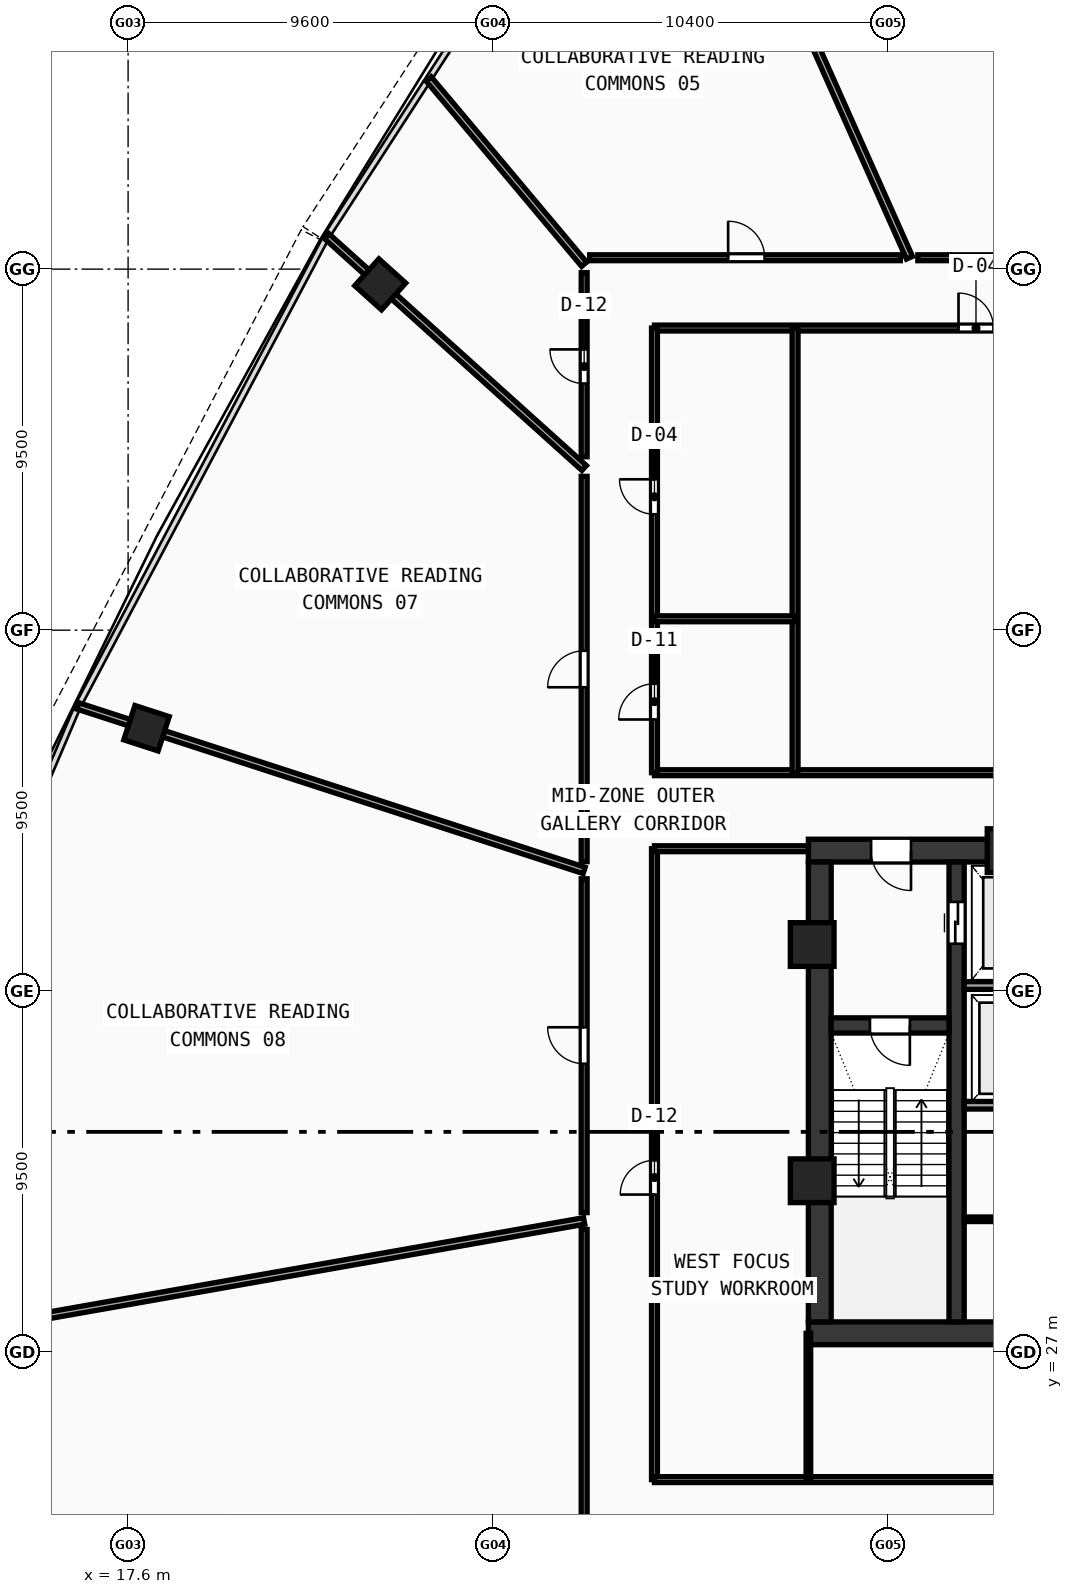
"""IFC4 building model, lengths in metres.
Left out: names, types, materials, properties, quantities, classifications, styles, units other than length and angle.
Written with IfcOpenShell. Run it as: python <this file> out.ifc"""

import sys

from ifc_helpers import new_model, si_unit, direction, frame, frame_2d, origin, origin_with_axes, origin_2d, place, context, subcontext, project, spatial, rectangle, hollow_rectangle, extrude, source, transform, mapped, element, fill, save


model = new_model("IFC4")
c1 = context("Model", 3, precision=1e-05, world=origin(), true_north=direction((0.0, 1.0)))
c2 = subcontext(c1, "Body", "Model", "MODEL_VIEW")
j1 = project(units=[si_unit("LENGTHUNIT", "METRE"), si_unit("PLANEANGLEUNIT", "RADIAN")], contexts=[c1])
p1 = place(None, origin())
s1 = spatial("IfcSite", under=j1, at=p1, CompositionType="ELEMENT")
p2 = place(p1, origin())
s2 = spatial("IfcBuilding", under=s1, at=p2, CompositionType="ELEMENT")
p3 = place(p2, frame((0.0, 0.0, 129.83)))
s3 = spatial("IfcBuildingStorey", under=s2, at=p3, CompositionType="ELEMENT", Elevation=129.83)
p4 = place(p3, frame((35.5, 27.5, 0.0), z_axis=(0.0, 0.0, 1.0), x_axis=(1.0, 0.0, 0.0)))
e1 = element("IfcWall", 1, at=p4, inside=s3, PredefinedType="SHEAR", context=c2, shape_type="SweptSolid", body=[
    extrude(rectangle(XDim=25.0, YDim=0.6, at=frame_2d((12.5, 0.0))), origin(), (0.0, 0.0, 1.0), 3.42),
])
p5 = place(p3, frame((35.5, 40.2, 0.0), z_axis=(0.0, 0.0, 1.0), x_axis=(1.0, 0.0, 0.0)))
e2 = element("IfcWall", 2, at=p5, inside=s3, PredefinedType="SHEAR", context=c2, shape_type="SweptSolid", body=[
    extrude(rectangle(XDim=11.3, YDim=0.6, at=frame_2d((5.65, 0.0))), origin(), (0.0, 0.0, 1.0), 3.42),
])
p6 = place(p5, frame((1.65, 0.0, 0.0)))
e3 = element("IfcOpeningElement", 3, at=p6, cuts=e2, PredefinedType="OPENING", context=c2, shape_type="SweptSolid", body=[
    extrude(rectangle(XDim=1.05, YDim=2.1, at=frame_2d((0.525, 1.05))), frame((0.0, 0.31, 0.0), z_axis=(0.0, -1.0, 0.0), x_axis=(1.0, 0.0, 0.0)), (0.0, 0.0, 1.0), 0.62),
])
p7 = place(p3, frame((35.8, 27.8, 0.0), z_axis=(0.0, 0.0, 1.0), x_axis=(0.0, 1.0, 0.0)))
e4 = element("IfcWall", 4, at=p7, inside=s3, PredefinedType="SHEAR", context=c2, shape_type="SweptSolid", body=[
    extrude(rectangle(XDim=12.1, YDim=0.6, at=frame_2d((6.05, 0.0))), origin(), (0.0, 0.0, 1.0), 3.42),
])
p8 = place(p3, frame((39.4, 27.8, 0.0), z_axis=(0.0, 0.0, 1.0), x_axis=(0.0, 1.0, 0.0)))
e5 = element("IfcWall", 5, at=p8, inside=s3, PredefinedType="SHEAR", context=c2, shape_type="SweptSolid", body=[
    extrude(rectangle(XDim=12.1, YDim=0.4, at=frame_2d((6.05, 0.0))), origin(), (0.0, 0.0, 1.0), 3.42),
])
p9 = place(p8, frame((9.95, 0.0, 0.0)))
e6 = element("IfcOpeningElement", 6, at=p9, cuts=e5, PredefinedType="OPENING", context=c2, shape_type="SweptSolid", body=[
    extrude(rectangle(XDim=1.1, YDim=2.1, at=frame_2d((0.55, 1.05))), frame((0.0, 0.21, 0.0), z_axis=(0.0, -1.0, 0.0), x_axis=(1.0, 0.0, 0.0)), (0.0, 0.0, 1.0), 0.42),
])
p10 = place(p3, frame((36.1, 35.6, 0.0), z_axis=(0.0, 0.0, 1.0), x_axis=(1.0, 0.0, 0.0)))
e7 = element("IfcWall", 7, at=p10, inside=s3, PredefinedType="SHEAR", context=c2, shape_type="SweptSolid", body=[
    extrude(rectangle(XDim=3.1, YDim=0.4, at=frame_2d((1.55, 0.0))), origin(), (0.0, 0.0, 1.0), 3.42),
])
p11 = place(p10, frame((1.02, 0.0, 0.0)))
e8 = element("IfcOpeningElement", 8, at=p11, cuts=e7, PredefinedType="OPENING", context=c2, shape_type="SweptSolid", body=[
    extrude(rectangle(XDim=1.05, YDim=2.1, at=frame_2d((0.525, 1.05))), frame((0.0, 0.21, 0.0), z_axis=(0.0, -1.0, 0.0), x_axis=(1.0, 0.0, 0.0)), (0.0, 0.0, 1.0), 0.42),
])
m1 = source(origin(), c2, "Body", "SweptSolid", [
    extrude(hollow_rectangle(XDim=1.15, YDim=1.15, WallThickness=0.048, at=origin_2d()), origin(), (0.0, 0.0, 1.0), 3.68),
])
for number, where, z_axis, x_axis in (
    (9, (40.781, 40.2, -0.26), (0.0, 0.0, 1.0), (1.0, 0.0, 0.0)),
    (10, (35.6, 37.729, -0.26), (0.0, 0.0, 1.0), (1.0, 0.0, 0.0)),
    (11, (35.6, 31.513, -0.26), (0.0, 0.0, 1.0), (1.0, 0.0, 0.0)),
):
    element("IfcColumn", number, at=place(p3, frame(where, z_axis=z_axis, x_axis=x_axis)), inside=s3, PredefinedType="COLUMN", context=c2, shape_type="MappedRepresentation", body=[
        mapped(m1, transform((0.0, 0.0, 0.0), scale=1.0)),
    ])
m2 = source(origin(), c2, "Body", "SweptSolid", [
    extrude(hollow_rectangle(XDim=0.95, YDim=0.95, WallThickness=0.04, at=origin_2d()), origin(), (0.0, 0.0, 1.0), 3.68),
])
for number, where, z_axis, x_axis in (
    (12, (24.234, 55.099, -0.26), (0.0, 0.0, 1.0), (-0.669, -0.743, 0.0)),
    (13, (18.085, 43.42, -0.26), (0.0, 0.0, 1.0), (-0.309, -0.951, 0.0)),
):
    element("IfcColumn", number, at=place(p3, frame(where, z_axis=z_axis, x_axis=x_axis)), inside=s3, PredefinedType="COLUMN", context=c2, shape_type="MappedRepresentation", body=[
        mapped(m2, transform((0.0, 0.0, 0.0), scale=1.0)),
    ])
for number, where, z_axis, x_axis in (
    (14, (39.6, 36.65, 0.0), (0.0, 0.0, 1.0), (1.0, 0.0, 0.0)),
    (15, (39.6, 33.5, 0.0), (0.0, 0.0, 1.0), (1.0, 0.0, 0.0)),
):
    element("IfcWall", number, at=place(p3, frame(where, z_axis=z_axis, x_axis=x_axis)), inside=s3, PredefinedType="SOLIDWALL", context=c2, shape_type="SweptSolid", body=[
        extrude(rectangle(XDim=2.72, YDim=0.2, at=frame_2d((1.36, 0.0))), origin(), (0.0, 0.0, 1.0), 3.42),
    ])
p12 = place(p3, frame((39.6, 30.5, 0.0), z_axis=(0.0, 0.0, 1.0), x_axis=(1.0, 0.0, 0.0)))
e16 = element("IfcWall", 16, at=p12, inside=s3, PredefinedType="PARTITIONING", context=c2, shape_type="SweptSolid", body=[
    extrude(rectangle(XDim=2.72, YDim=0.12, at=frame_2d((1.36, 0.0))), origin(), (0.0, 0.0, 1.0), 3.42),
])
p13 = place(p3, frame((31.45, 42.25, 0.0), z_axis=(0.0, 0.0, 1.0), x_axis=(1.0, 0.0, 0.0)))
e17 = element("IfcWall", 17, at=p13, inside=s3, PredefinedType="PARTITIONING", context=c2, shape_type="SweptSolid", body=[
    extrude(rectangle(XDim=33.1, YDim=0.155, at=frame_2d((16.55, 0.0))), origin(), (0.0, 0.0, 1.0), 2.77),
])
p14 = place(p3, frame((31.45, 53.95, 0.0), z_axis=(0.0, 0.0, 1.0), x_axis=(1.0, 0.0, 0.0)))
e18 = element("IfcWall", 18, at=p14, inside=s3, PredefinedType="PARTITIONING", context=c2, shape_type="SweptSolid", body=[
    extrude(rectangle(XDim=33.1, YDim=0.155, at=frame_2d((16.55, 0.0))), origin(), (0.0, 0.0, 1.0), 2.77),
])
p15 = place(p14, frame((8.0, 0.0, 0.0)))
e19 = element("IfcOpeningElement", 19, at=p15, cuts=e18, PredefinedType="OPENING", context=c2, shape_type="SweptSolid", body=[
    extrude(rectangle(XDim=0.92, YDim=2.1, at=frame_2d((0.46, 1.05))), frame((0.0, 0.087, 0.0), z_axis=(0.0, -1.0, 0.0), x_axis=(1.0, 0.0, 0.0)), (0.0, 0.0, 1.0), 0.175),
])
p16 = place(p14, frame((22.55, 0.0, 0.0)))
e20 = element("IfcOpeningElement", 20, at=p16, cuts=e18, PredefinedType="OPENING", context=c2, shape_type="SweptSolid", body=[
    extrude(rectangle(XDim=0.92, YDim=2.1, at=frame_2d((0.46, 1.05))), frame((0.0, 0.087, 0.0), z_axis=(0.0, -1.0, 0.0), x_axis=(1.0, 0.0, 0.0)), (0.0, 0.0, 1.0), 0.175),
])
p17 = place(p3, frame((31.45, 42.25, 0.0), z_axis=(0.0, 0.0, 1.0), x_axis=(0.0, 1.0, 0.0)))
e21 = element("IfcWall", 21, at=p17, inside=s3, PredefinedType="PARTITIONING", context=c2, shape_type="SweptSolid", body=[
    extrude(rectangle(XDim=11.7, YDim=0.155, at=frame_2d((5.85, 0.0))), origin(), (0.0, 0.0, 1.0), 2.77),
])
p18 = place(p17, frame((1.4, 0.0, 0.0)))
e22 = element("IfcOpeningElement", 22, at=p18, cuts=e21, PredefinedType="OPENING", context=c2, shape_type="SweptSolid", body=[
    extrude(rectangle(XDim=0.94, YDim=2.1, at=frame_2d((0.47, 1.05))), frame((0.0, 0.087, 0.0), z_axis=(0.0, -1.0, 0.0), x_axis=(1.0, 0.0, 0.0)), (0.0, 0.0, 1.0), 0.175),
])
p19 = place(p17, frame((6.8, 0.0, 0.0)))
e23 = element("IfcOpeningElement", 23, at=p19, cuts=e21, PredefinedType="OPENING", context=c2, shape_type="SweptSolid", body=[
    extrude(rectangle(XDim=0.92, YDim=2.1, at=frame_2d((0.46, 1.05))), frame((0.0, 0.087, 0.0), z_axis=(0.0, -1.0, 0.0), x_axis=(1.0, 0.0, 0.0)), (0.0, 0.0, 1.0), 0.175),
])
p20 = place(p3, frame((35.15, 42.25, 0.0), z_axis=(0.0, 0.0, 1.0), x_axis=(0.0, 1.0, 0.0)))
e24 = element("IfcWall", 24, at=p20, inside=s3, PredefinedType="PARTITIONING", context=c2, shape_type="SweptSolid", body=[
    extrude(rectangle(XDim=11.7, YDim=0.155, at=frame_2d((5.85, 0.0))), origin(), (0.0, 0.0, 1.0), 2.77),
])
p21 = place(p3, frame((31.45, 46.3, 0.0), z_axis=(0.0, 0.0, 1.0), x_axis=(1.0, 0.0, 0.0)))
e25 = element("IfcWall", 25, at=p21, inside=s3, PredefinedType="PARTITIONING", context=c2, shape_type="SweptSolid", body=[
    extrude(rectangle(XDim=3.7, YDim=0.155, at=frame_2d((1.85, 0.0))), origin(), (0.0, 0.0, 1.0), 2.77),
])
p22 = place(p3, frame((31.45, 23.65, 0.0), z_axis=(0.0, 0.0, 1.0), x_axis=(0.0, 1.0, 0.0)))
e26 = element("IfcWall", 26, at=p22, inside=s3, PredefinedType="PARTITIONING", context=c2, shape_type="SweptSolid", body=[
    extrude(rectangle(XDim=16.6, YDim=0.155, at=frame_2d((8.3, 0.0))), origin(), (0.0, 0.0, 1.0), 2.77),
])
p23 = place(p22, frame((7.5, 0.0, 0.0)))
e27 = element("IfcOpeningElement", 27, at=p23, cuts=e26, PredefinedType="OPENING", context=c2, shape_type="SweptSolid", body=[
    extrude(rectangle(XDim=0.9, YDim=2.08, at=frame_2d((0.45, 1.04))), frame((0.0, 0.087, 0.0), z_axis=(0.0, -1.0, 0.0), x_axis=(1.0, 0.0, 0.0)), (0.0, 0.0, 1.0), 0.175),
])
p24 = place(p3, frame((31.45, 23.65, 0.0), z_axis=(0.0, 0.0, 1.0), x_axis=(1.0, 0.0, 0.0)))
e28 = element("IfcWall", 28, at=p24, inside=s3, PredefinedType="PARTITIONING", context=c2, shape_type="SweptSolid", body=[
    extrude(rectangle(XDim=33.1, YDim=0.155, at=frame_2d((16.55, 0.0))), origin(), (0.0, 0.0, 1.0), 2.77),
])
p25 = place(p24, frame((16.0, 0.0, 0.0)))
e29 = element("IfcOpeningElement", 29, at=p25, cuts=e28, PredefinedType="OPENING", context=c2, shape_type="SweptSolid", body=[
    extrude(rectangle(XDim=0.92, YDim=2.1, at=frame_2d((0.46, 1.05))), frame((0.0, 0.087, 0.0), z_axis=(0.0, -1.0, 0.0), x_axis=(1.0, 0.0, 0.0)), (0.0, 0.0, 1.0), 0.175),
])
p26 = place(p3, frame((31.45, 40.25, 0.0), z_axis=(0.0, 0.0, 1.0), x_axis=(1.0, 0.0, 0.0)))
e30 = element("IfcWall", 30, at=p26, inside=s3, PredefinedType="PARTITIONING", context=c2, shape_type="SweptSolid", body=[
    extrude(rectangle(XDim=4.05, YDim=0.155, at=frame_2d((2.025, 0.0))), origin(), (0.0, 0.0, 1.0), 3.42),
])
p27 = place(p3, frame((35.5, 23.65, 0.0), z_axis=(0.0, 0.0, 1.0), x_axis=(0.0, 1.0, 0.0)))
e31 = element("IfcWall", 31, at=p27, inside=s3, PredefinedType="PARTITIONING", context=c2, shape_type="SweptSolid", body=[
    extrude(rectangle(XDim=3.85, YDim=0.12, at=frame_2d((1.925, 0.0))), origin(), (0.0, 0.0, 1.0), 3.02),
])
p28 = place(p3, frame((38.16, 55.8, 0.0), z_axis=(0.0, 0.0, 1.0), x_axis=(-0.406729069032, 0.913548829787, 0.0)))
e32 = element("IfcWall", 32, at=p28, inside=s3, PredefinedType="PARTITIONING", context=c2, shape_type="SweptSolid", body=[
    extrude(rectangle(XDim=15.723, YDim=0.175, at=frame_2d((7.862, 0.0))), origin(), (0.0, 0.0, 1.0), 2.77),
])
p29 = place(p3, frame((29.6, 55.628, 0.0), z_axis=(0.0, 0.0, 1.0), x_axis=(-0.642790889975, 0.766041690618, 0.0)))
e33 = element("IfcWall", 33, at=p29, inside=s3, PredefinedType="PARTITIONING", context=c2, shape_type="SweptSolid", body=[
    extrude(rectangle(XDim=6.366, YDim=0.175, at=frame_2d((3.183, 0.0))), origin(), (0.0, 0.0, 1.0), 2.77),
])
p30 = place(p3, frame((29.6, 50.267, 0.0), z_axis=(0.0, 0.0, 1.0), x_axis=(-0.743139639416, 0.669136366018, 0.0)))
e34 = element("IfcWall", 34, at=p30, inside=s3, PredefinedType="PARTITIONING", context=c2, shape_type="SweptSolid", body=[
    extrude(rectangle(XDim=9.115, YDim=0.175, at=frame_2d((4.558, 0.0))), origin(), (0.0, 0.0, 1.0), 2.77),
])
p31 = place(p3, frame((29.6, 39.678, 0.0), z_axis=(0.0, 0.0, 1.0), x_axis=(-0.95105622709, 0.309017884457, 0.0)))
e35 = element("IfcWall", 35, at=p31, inside=s3, PredefinedType="PARTITIONING", context=c2, shape_type="SweptSolid", body=[
    extrude(rectangle(XDim=14.006, YDim=0.175, at=frame_2d((7.003, 0.0))), origin(), (0.0, 0.0, 1.0), 2.77),
])
p32 = place(p3, frame((29.6, 30.456, 0.0), z_axis=(0.0, 0.0, 1.0), x_axis=(-0.98480711194, -0.173651813328, 0.0)))
e36 = element("IfcWall", 36, at=p32, inside=s3, PredefinedType="PARTITIONING", context=c2, shape_type="SweptSolid", body=[
    extrude(rectangle(XDim=20.967, YDim=0.175, at=frame_2d((10.483, 0.0))), origin(), (0.0, 0.0, 1.0), 2.77),
])
p33 = place(p3, frame((29.6, 21.8, 0.0), z_axis=(0.0, 0.0, 1.0), x_axis=(0.0, 1.0, 0.0)))
e37 = element("IfcWall", 37, at=p33, inside=s3, PredefinedType="PARTITIONING", context=c2, shape_type="SweptSolid", body=[
    extrude(rectangle(XDim=8.432, YDim=0.155, at=frame_2d((4.216, 0.0))), origin(), (0.0, 0.0, 1.0), 3.02),
])
p34 = place(p3, frame((29.6, 30.675, 0.0), z_axis=(0.0, 0.0, 1.0), x_axis=(0.0, 1.0, 0.0)))
e38 = element("IfcWall", 38, at=p34, inside=s3, PredefinedType="PARTITIONING", context=c2, shape_type="SweptSolid", body=[
    extrude(rectangle(XDim=8.783, YDim=0.155, at=frame_2d((4.392, 0.0))), origin(), (0.0, 0.0, 1.0), 3.42),
])
p35 = place(p34, frame((3.917, 0.0, 0.0)))
e39 = element("IfcOpeningElement", 39, at=p35, cuts=e38, PredefinedType="OPENING", context=c2, shape_type="SweptSolid", body=[
    extrude(rectangle(XDim=0.96, YDim=2.12, at=frame_2d((0.48, 1.06))), frame((0.0, 0.087, 0.0), z_axis=(0.0, -1.0, 0.0), x_axis=(1.0, 0.0, 0.0)), (0.0, 0.0, 1.0), 0.175),
])
p36 = place(p3, frame((29.6, 39.91, 0.0), z_axis=(0.0, 0.0, 1.0), x_axis=(0.0, 1.0, 0.0)))
e40 = element("IfcWall", 40, at=p36, inside=s3, PredefinedType="PARTITIONING", context=c2, shape_type="SweptSolid", body=[
    extrude(rectangle(XDim=10.138, YDim=0.155, at=frame_2d((5.069, 0.0))), origin(), (0.0, 0.0, 1.0), 2.77),
])
p37 = place(p36, frame((4.588, 0.0, 0.0)))
e41 = element("IfcOpeningElement", 41, at=p37, cuts=e40, PredefinedType="OPENING", context=c2, shape_type="SweptSolid", body=[
    extrude(rectangle(XDim=0.96, YDim=2.12, at=frame_2d((0.48, 1.06))), frame((0.0, 0.087, 0.0), z_axis=(0.0, -1.0, 0.0), x_axis=(1.0, 0.0, 0.0)), (0.0, 0.0, 1.0), 0.175),
])
p38 = place(p3, frame((29.6, 50.563, 0.0), z_axis=(0.0, 0.0, 1.0), x_axis=(0.0, 1.0, 0.0)))
e42 = element("IfcWall", 42, at=p38, inside=s3, PredefinedType="PARTITIONING", context=c2, shape_type="SweptSolid", body=[
    extrude(rectangle(XDim=4.845, YDim=0.155, at=frame_2d((2.422, 0.0))), origin(), (0.0, 0.0, 1.0), 3.02),
])
p39 = place(p38, frame((1.925, 0.0, 0.0)))
e43 = element("IfcOpeningElement", 43, at=p39, cuts=e42, PredefinedType="OPENING", context=c2, shape_type="SweptSolid", body=[
    extrude(rectangle(XDim=0.9, YDim=2.08, at=frame_2d((0.45, 1.04))), frame((0.0, 0.087, 0.0), z_axis=(0.0, -1.0, 0.0), x_axis=(1.0, 0.0, 0.0)), (0.0, 0.0, 1.0), 0.175),
])
p40 = place(p3, frame((29.743, 55.8, 0.0), z_axis=(0.0, 0.0, 1.0), x_axis=(1.0, 0.0, 0.0)))
e44 = element("IfcWall", 44, at=p40, inside=s3, PredefinedType="PARTITIONING", context=c2, shape_type="SweptSolid", body=[
    extrude(rectangle(XDim=8.177, YDim=0.155, at=frame_2d((4.088, 0.0))), origin(), (0.0, 0.0, 1.0), 3.02),
])
p41 = place(p40, frame((3.646, 0.0, 0.0)))
e45 = element("IfcOpeningElement", 45, at=p41, cuts=e44, PredefinedType="OPENING", context=c2, shape_type="SweptSolid", body=[
    extrude(rectangle(XDim=0.96, YDim=2.12, at=frame_2d((0.48, 1.06))), frame((0.0, 0.087, 0.0), z_axis=(0.0, -1.0, 0.0), x_axis=(1.0, 0.0, 0.0)), (0.0, 0.0, 1.0), 0.175),
])
p42 = place(p3, frame((38.38, 55.8, 0.0), z_axis=(0.0, 0.0, 1.0), x_axis=(1.0, 0.0, 0.0)))
e46 = element("IfcWall", 46, at=p42, inside=s3, PredefinedType="PARTITIONING", context=c2, shape_type="SweptSolid", body=[
    extrude(rectangle(XDim=5.329, YDim=0.155, at=frame_2d((2.665, 0.0))), origin(), (0.0, 0.0, 1.0), 2.77),
])
p43 = place(p42, frame((2.115, 0.0, 0.0)))
e47 = element("IfcOpeningElement", 47, at=p43, cuts=e46, PredefinedType="OPENING", context=c2, shape_type="SweptSolid", body=[
    extrude(rectangle(XDim=0.96, YDim=2.12, at=frame_2d((0.48, 1.06))), frame((0.0, 0.087, 0.0), z_axis=(0.0, -1.0, 0.0), x_axis=(1.0, 0.0, 0.0)), (0.0, 0.0, 1.0), 0.175),
])
m3 = source(origin(), c2, "Body", "SweptSolid", [
    extrude(rectangle(XDim=1.05, YDim=2.1, at=frame_2d((0.525, 1.05))), frame((0.0, 0.025, 0.0), z_axis=(0.0, -1.0, 0.0), x_axis=(1.0, 0.0, 0.0)), (0.0, 0.0, 1.0), 0.05),
])
p44 = place(p11, frame((1.05, 0.0, 0.0), z_axis=(0.0, 0.0, 1.0), x_axis=(-1.0, 0.0, 0.0)))
e48 = element("IfcDoor", 48, at=p44, inside=s3, OperationType="SINGLE_SWING_LEFT", PredefinedType="DOOR", context=c2, shape_type="MappedRepresentation", body=[
    mapped(m3, transform((0.0, 0.0, 0.0), scale=1.0)),
])
fill(e8, e48)
p45 = place(p6, frame((1.05, 0.0, 0.0), z_axis=(0.0, 0.0, 1.0), x_axis=(-1.0, 0.0, 0.0)))
e49 = element("IfcDoor", 49, at=p45, inside=s3, OperationType="SINGLE_SWING_LEFT", PredefinedType="DOOR", context=c2, shape_type="MappedRepresentation", body=[
    mapped(m3, transform((0.0, 0.0, 0.0), scale=1.0)),
])
fill(e3, e49)
m4 = source(origin(), c2, "Body", "SweptSolid", [
    extrude(rectangle(XDim=1.1, YDim=2.1, at=frame_2d((0.55, 1.05))), frame((0.0, 0.025, 0.0), z_axis=(0.0, -1.0, 0.0), x_axis=(1.0, 0.0, 0.0)), (0.0, 0.0, 1.0), 0.05),
])
p46 = place(p9, frame((1.1, 0.0, 0.0), z_axis=(0.0, 0.0, 1.0), x_axis=(-1.0, 0.0, 0.0)))
e50 = element("IfcDoor", 50, at=p46, inside=s3, OperationType="DOUBLE_DOOR_SLIDING", PredefinedType="DOOR", context=c2, shape_type="MappedRepresentation", body=[
    mapped(m4, transform((0.0, 0.0, 0.0), scale=1.0)),
])
fill(e6, e50)
m5 = source(origin(), c2, "Body", "SweptSolid", [
    extrude(rectangle(XDim=0.94, YDim=2.1, at=frame_2d((0.47, 1.05))), frame((0.0, 0.025, 0.0), z_axis=(0.0, -1.0, 0.0), x_axis=(1.0, 0.0, 0.0)), (0.0, 0.0, 1.0), 0.05),
])
p47 = place(p18, origin_with_axes())
e51 = element("IfcDoor", 51, at=p47, inside=s3, OperationType="SINGLE_SWING_LEFT", PredefinedType="DOOR", context=c2, shape_type="MappedRepresentation", body=[
    mapped(m5, transform((0.0, 0.0, 0.0), scale=1.0)),
])
fill(e22, e51)
m6 = source(origin(), c2, "Body", "SweptSolid", [
    extrude(rectangle(XDim=0.92, YDim=2.1, at=frame_2d((0.46, 1.05))), frame((0.0, 0.025, 0.0), z_axis=(0.0, -1.0, 0.0), x_axis=(1.0, 0.0, 0.0)), (0.0, 0.0, 1.0), 0.05),
])
p48 = place(p19, origin_with_axes())
e52 = element("IfcDoor", 52, at=p48, inside=s3, OperationType="SINGLE_SWING_RIGHT", PredefinedType="DOOR", context=c2, shape_type="MappedRepresentation", body=[
    mapped(m6, transform((0.0, 0.0, 0.0), scale=1.0)),
])
fill(e23, e52)
p49 = place(p15, origin_with_axes())
e53 = element("IfcDoor", 53, at=p49, inside=s3, OperationType="SINGLE_SWING_LEFT", PredefinedType="DOOR", context=c2, shape_type="MappedRepresentation", body=[
    mapped(m6, transform((0.0, 0.0, 0.0), scale=1.0)),
])
fill(e19, e53)
m7 = source(origin(), c2, "Body", "SweptSolid", [
    extrude(rectangle(XDim=0.9, YDim=2.08, at=frame_2d((0.45, 1.04))), frame((0.0, 0.025, 0.0), z_axis=(0.0, -1.0, 0.0), x_axis=(1.0, 0.0, 0.0)), (0.0, 0.0, 1.0), 0.05),
])
p50 = place(p23, origin_with_axes())
e54 = element("IfcDoor", 54, at=p50, inside=s3, OperationType="SINGLE_SWING_LEFT", PredefinedType="DOOR", context=c2, shape_type="MappedRepresentation", body=[
    mapped(m7, transform((0.0, 0.0, 0.0), scale=1.0)),
])
fill(e27, e54)
m8 = source(origin(), c2, "Body", "SweptSolid", [
    extrude(rectangle(XDim=0.96, YDim=2.12, at=frame_2d((0.48, 1.06))), frame((0.0, 0.025, 0.0), z_axis=(0.0, -1.0, 0.0), x_axis=(1.0, 0.0, 0.0)), (0.0, 0.0, 1.0), 0.05),
])
p51 = place(p41, origin_with_axes())
e55 = element("IfcDoor", 55, at=p51, inside=s3, OperationType="SINGLE_SWING_LEFT", PredefinedType="DOOR", context=c2, shape_type="MappedRepresentation", body=[
    mapped(m8, transform((0.0, 0.0, 0.0), scale=1.0)),
])
fill(e45, e55)
p52 = place(p39, origin_with_axes())
e56 = element("IfcDoor", 56, at=p52, inside=s3, OperationType="SINGLE_SWING_RIGHT", PredefinedType="DOOR", context=c2, shape_type="MappedRepresentation", body=[
    mapped(m7, transform((0.0, 0.0, 0.0), scale=1.0)),
])
fill(e43, e56)
p53 = place(p37, origin_with_axes())
e57 = element("IfcDoor", 57, at=p53, inside=s3, OperationType="SINGLE_SWING_LEFT", PredefinedType="DOOR", context=c2, shape_type="MappedRepresentation", body=[
    mapped(m8, transform((0.0, 0.0, 0.0), scale=1.0)),
])
fill(e41, e57)
p54 = place(p35, origin_with_axes())
e58 = element("IfcDoor", 58, at=p54, inside=s3, OperationType="SINGLE_SWING_RIGHT", PredefinedType="DOOR", context=c2, shape_type="MappedRepresentation", body=[
    mapped(m8, transform((0.0, 0.0, 0.0), scale=1.0)),
])
fill(e39, e58)
save(model, sys.argv[1])
